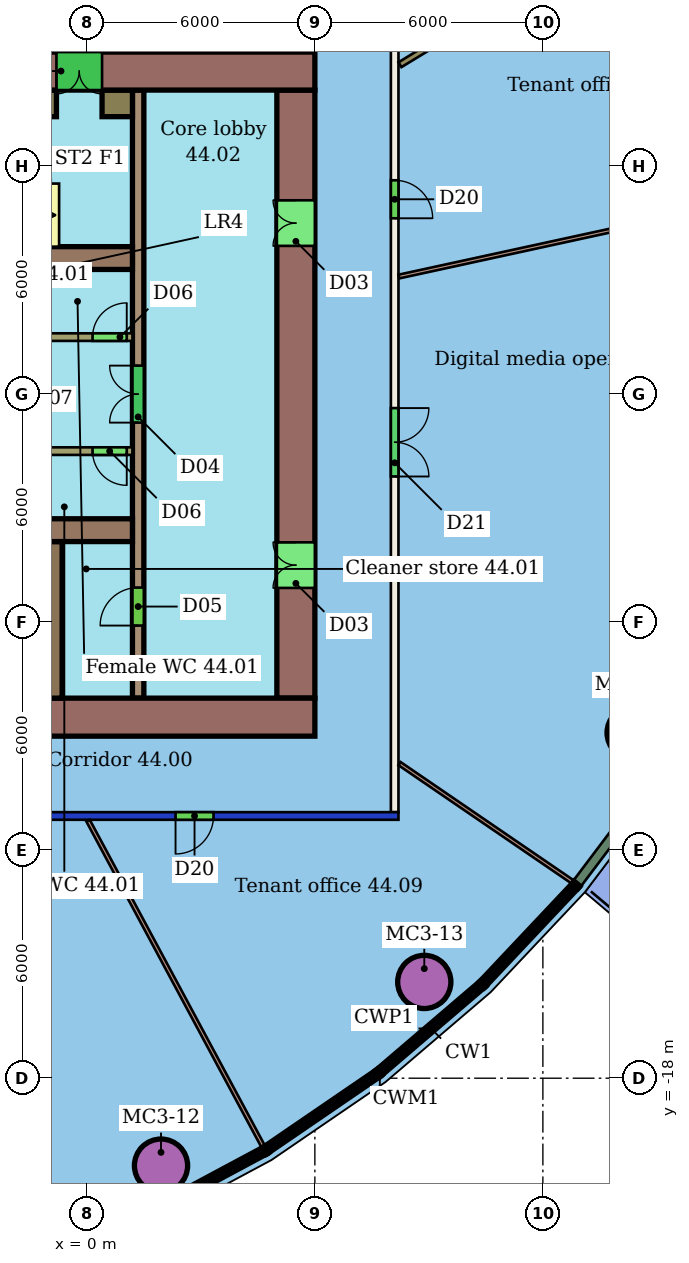
"""IFC4 building model, lengths in metres.
Left out: names, types, materials, properties, quantities, classifications, styles, units other than length and angle.
Written with IfcOpenShell. Run it as: python <this file> out.ifc"""

import sys

from ifc_helpers import new_model, si_unit, direction, frame, frame_2d, origin, origin_2d, place, context, subcontext, project, spatial, rectangle, hollow_circle, extrude, element, fill, save


model = new_model("IFC4")
c1 = context("Model", 3, precision=1e-05, world=origin(), true_north=direction((0.0, 1.0)))
c2 = subcontext(c1, "Body", "Model", "MODEL_VIEW")
j1 = project(units=[si_unit("LENGTHUNIT", "METRE"), si_unit("PLANEANGLEUNIT", "RADIAN")], contexts=[c1])
p1 = place(None, origin())
s1 = spatial("IfcSite", under=j1, at=p1, CompositionType="ELEMENT")
p2 = place(p1, origin())
s2 = spatial("IfcBuilding", under=s1, at=p2, CompositionType="ELEMENT")
p3 = place(p2, frame((0.0, 0.0, 183.0)))
s3 = spatial("IfcBuildingStorey", under=s2, at=p3, CompositionType="ELEMENT", Elevation=183.0)
for number, where, z_axis, x_axis in (
    (1, (1.952, -20.301, 0.0), (0.0, 0.0, 1.0), (1.0, 0.0, 0.0)),
    (2, (8.879, -15.467, 0.0), (0.0, 0.0, 1.0), (1.0, 0.0, 0.0)),
    (3, (14.388, -8.912, 0.0), (0.0, 0.0, 1.0), (1.0, 0.0, 0.0)),
):
    element("IfcColumn", number, at=place(p3, frame(where, z_axis=z_axis, x_axis=x_axis)), inside=s3, PredefinedType="COLUMN", context=c2, shape_type="SweptSolid", body=[
        extrude(hollow_circle(Radius=0.7, WallThickness=0.05, at=origin_2d()), origin(), (0.0, 0.0, 1.0), 3.45),
    ])
p4 = place(p3, frame((8.2, -11.1, 0.0), z_axis=(0.0, 0.0, 1.0), x_axis=(-1.0, 0.0, 0.0)))
e4 = element("IfcWall", 4, at=p4, inside=s3, PredefinedType="PARTITIONING", context=c2, shape_type="SweptSolid", body=[
    extrude(rectangle(XDim=28.4, YDim=0.2, at=frame_2d((14.2, 0.0))), origin(), (0.0, 0.0, 1.0), 3.05),
])
p5 = place(p4, frame((22.184, 0.0, 0.0)))
e5 = element("IfcOpeningElement", 5, at=p5, cuts=e4, PredefinedType="OPENING", context=c2, shape_type="SweptSolid", body=[
    extrude(rectangle(XDim=1.8, YDim=2.1, at=frame_2d((0.9, 1.05))), frame((0.0, 0.11, 0.0), z_axis=(0.0, -1.0, 0.0), x_axis=(1.0, 0.0, 0.0)), (0.0, 0.0, 1.0), 0.22),
])
p6 = place(p4, frame((15.038, 0.0, 0.0)))
e6 = element("IfcOpeningElement", 6, at=p6, cuts=e4, PredefinedType="OPENING", context=c2, shape_type="SweptSolid", body=[
    extrude(rectangle(XDim=1.8, YDim=2.1, at=frame_2d((0.9, 1.05))), frame((0.0, 0.11, 0.0), z_axis=(0.0, -1.0, 0.0), x_axis=(1.0, 0.0, 0.0)), (0.0, 0.0, 1.0), 0.22),
])
p7 = place(p4, frame((4.866, 0.0, 0.0)))
e7 = element("IfcOpeningElement", 7, at=p7, cuts=e4, PredefinedType="OPENING", context=c2, shape_type="SweptSolid", body=[
    extrude(rectangle(XDim=1.0, YDim=2.1, at=frame_2d((0.5, 1.05))), frame((0.0, 0.11, 0.0), z_axis=(0.0, -1.0, 0.0), x_axis=(1.0, 0.0, 0.0)), (0.0, 0.0, 1.0), 0.22),
])
p8 = place(p3, frame((8.1, 11.0, 0.0), z_axis=(0.0, 0.0, 1.0), x_axis=(0.0, -1.0, 0.0)))
e8 = element("IfcWall", 8, at=p8, inside=s3, PredefinedType="PARTITIONING", context=c2, shape_type="SweptSolid", body=[
    extrude(rectangle(XDim=22.0, YDim=0.2, at=frame_2d((11.0, 0.0))), origin(), (0.0, 0.0, 1.0), 3.45),
])
p9 = place(p8, frame((11.367, 0.0, 0.0)))
e9 = element("IfcOpeningElement", 9, at=p9, cuts=e8, PredefinedType="OPENING", context=c2, shape_type="SweptSolid", body=[
    extrude(rectangle(XDim=1.8, YDim=2.1, at=frame_2d((0.9, 1.05))), frame((0.0, 0.11, 0.0), z_axis=(0.0, -1.0, 0.0), x_axis=(1.0, 0.0, 0.0)), (0.0, 0.0, 1.0), 0.22),
])
p10 = place(p8, frame((5.373, 0.0, 0.0)))
e10 = element("IfcOpeningElement", 10, at=p10, cuts=e8, PredefinedType="OPENING", context=c2, shape_type="SweptSolid", body=[
    extrude(rectangle(XDim=1.0, YDim=2.1, at=frame_2d((0.5, 1.05))), frame((0.0, 0.11, 0.0), z_axis=(0.0, -1.0, 0.0), x_axis=(1.0, 0.0, 0.0)), (0.0, 0.0, 1.0), 0.22),
])
p11 = place(p3, frame((4.636, -19.79, 0.0), z_axis=(0.0, 0.0, 1.0), x_axis=(-0.473408054694, 0.880843240169, 0.0)))
e11 = element("IfcWall", 11, at=p11, inside=s3, PredefinedType="PARTITIONING", context=c2, shape_type="SweptSolid", body=[
    extrude(rectangle(XDim=9.725, YDim=0.1, at=frame_2d((4.863, 0.0))), origin(), (0.0, 0.0, 1.0), 3.45),
])
p12 = place(p3, frame((12.779, -12.832, 0.0), z_axis=(0.0, 0.0, 1.0), x_axis=(-0.825651519224, 0.564180439933, 0.0)))
e12 = element("IfcWall", 12, at=p12, inside=s3, PredefinedType="PARTITIONING", context=c2, shape_type="SweptSolid", body=[
    extrude(rectangle(XDim=5.512, YDim=0.1, at=frame_2d((2.756, 0.0))), origin(), (0.0, 0.0, 1.0), 3.45),
])
p13 = place(p3, frame((19.634, 5.58, 0.0), z_axis=(0.0, 0.0, 1.0), x_axis=(-0.977119787855, -0.212689727497, 0.0)))
e13 = element("IfcWall", 13, at=p13, inside=s3, PredefinedType="PARTITIONING", context=c2, shape_type="SweptSolid", body=[
    extrude(rectangle(XDim=11.691, YDim=0.1, at=frame_2d((5.846, 0.0))), origin(), (0.0, 0.0, 1.0), 3.45),
])
p14 = place(p3, frame((17.335, 14.204, 0.0), z_axis=(0.0, 0.0, 1.0), x_axis=(-0.854194128167, -0.51995422049, 0.0)))
e14 = element("IfcWall", 14, at=p14, inside=s3, PredefinedType="PARTITIONING", context=c2, shape_type="SweptSolid", body=[
    extrude(rectangle(XDim=10.648, YDim=0.15, at=frame_2d((5.324, 0.0))), origin(), (0.0, 0.0, 1.0), 3.45),
])
p15 = place(p3, frame((12.908, -12.869, 0.0), z_axis=(0.0, 0.0, 1.0), x_axis=(0.602031278038, 0.798472504388, 0.0)))
e15 = element("IfcWall", 15, at=p15, inside=s3, PredefinedType="SOLIDWALL", context=c2, shape_type="SweptSolid", body=[
    extrude(rectangle(XDim=3.477, YDim=0.25, at=frame_2d((1.739, 0.0))), origin(), (0.0, 0.0, 1.0), 3.1),
])
p16 = place(p3, frame((6.0, 8.5, 0.0), z_axis=(0.0, 0.0, 1.0), x_axis=(-1.0, 0.0, 0.0)))
e16 = element("IfcWall", 16, at=p16, inside=s3, PredefinedType="SHEAR", context=c2, shape_type="SweptSolid", body=[
    extrude(rectangle(XDim=12.0, YDim=1.0, at=frame_2d((6.0, 0.0))), origin(), (0.0, 0.0, 1.0), 3.3),
])
p17 = place(p16, frame((5.6, 0.0, 0.0)))
e17 = element("IfcOpeningElement", 17, at=p17, cuts=e16, PredefinedType="OPENING", context=c2, shape_type="SweptSolid", body=[
    extrude(rectangle(XDim=1.2, YDim=2.1, at=frame_2d((0.6, 1.05))), frame((0.0, 0.51, 0.0), z_axis=(0.0, -1.0, 0.0), x_axis=(1.0, 0.0, 0.0)), (0.0, 0.0, 1.0), 1.02),
])
p18 = place(p3, frame((-18.0, -8.5, 0.0), z_axis=(0.0, 0.0, 1.0), x_axis=(1.0, 0.0, 0.0)))
e18 = element("IfcWall", 18, at=p18, inside=s3, PredefinedType="SHEAR", context=c2, shape_type="SweptSolid", body=[
    extrude(rectangle(XDim=24.0, YDim=1.0, at=frame_2d((12.0, 0.0))), origin(), (0.0, 0.0, 1.0), 3.3),
])
p19 = place(p18, frame((6.0, 0.0, 0.0)))
e19 = element("IfcOpeningElement", 19, at=p19, cuts=e18, PredefinedType="OPENING", context=c2, shape_type="SweptSolid", body=[
    extrude(rectangle(XDim=1.2, YDim=2.1, at=frame_2d((0.6, 1.05))), frame((0.0, 0.51, 0.0), z_axis=(0.0, -1.0, 0.0), x_axis=(1.0, 0.0, 0.0)), (0.0, 0.0, 1.0), 1.02),
])
p20 = place(p3, frame((5.5, -8.0, 0.0), z_axis=(0.0, 0.0, 1.0), x_axis=(0.0, 1.0, 0.0)))
e20 = element("IfcWall", 20, at=p20, inside=s3, PredefinedType="SHEAR", context=c2, shape_type="SweptSolid", body=[
    extrude(rectangle(XDim=16.0, YDim=1.0, at=frame_2d((8.0, 0.0))), origin(), (0.0, 0.0, 1.0), 3.3),
])
p21 = place(p20, frame((2.9, 0.0, 0.0)))
e21 = element("IfcOpeningElement", 21, at=p21, cuts=e20, PredefinedType="OPENING", context=c2, shape_type="SweptSolid", body=[
    extrude(rectangle(XDim=1.2, YDim=2.1, at=frame_2d((0.6, 1.05))), frame((0.0, 0.51, 0.0), z_axis=(0.0, -1.0, 0.0), x_axis=(1.0, 0.0, 0.0)), (0.0, 0.0, 1.0), 1.02),
])
p22 = place(p20, frame((11.9, 0.0, 0.0)))
e22 = element("IfcOpeningElement", 22, at=p22, cuts=e20, PredefinedType="OPENING", context=c2, shape_type="SweptSolid", body=[
    extrude(rectangle(XDim=1.2, YDim=2.1, at=frame_2d((0.6, 1.05))), frame((0.0, 0.51, 0.0), z_axis=(0.0, -1.0, 0.0), x_axis=(1.0, 0.0, 0.0)), (0.0, 0.0, 1.0), 1.02),
])
for number, where, z_axis, x_axis in (
    (23, (-6.0, 3.58, 0.0), (0.0, 0.0, 1.0), (1.0, 0.0, 0.0)),
    (24, (-6.0, -3.58, 0.0), (0.0, 0.0, 1.0), (1.0, 0.0, 0.0)),
):
    element("IfcWall", number, at=place(p3, frame(where, z_axis=z_axis, x_axis=x_axis)), inside=s3, PredefinedType="SHEAR", context=c2, shape_type="SweptSolid", body=[
        extrude(rectangle(XDim=7.2, YDim=0.6, at=frame_2d((3.6, 0.0))), origin(), (0.0, 0.0, 1.0), 3.3),
    ])
p23 = place(p3, frame((1.35, -8.0, 0.0), z_axis=(0.0, 0.0, 1.0), x_axis=(0.0, 1.0, 0.0)))
e25 = element("IfcWall", 25, at=p23, inside=s3, PredefinedType="SHEAR", context=c2, shape_type="SweptSolid", body=[
    extrude(rectangle(XDim=16.0, YDim=0.3, at=frame_2d((8.0, 0.0))), origin(), (0.0, 0.0, 1.0), 3.3),
])
p24 = place(p23, frame((1.91, 0.0, 0.0)))
e26 = element("IfcOpeningElement", 26, at=p24, cuts=e25, PredefinedType="OPENING", context=c2, shape_type="SweptSolid", body=[
    extrude(rectangle(XDim=1.0, YDim=2.1, at=frame_2d((0.5, 1.05))), frame((0.0, 0.16, 0.0), z_axis=(0.0, -1.0, 0.0), x_axis=(1.0, 0.0, 0.0)), (0.0, 0.0, 1.0), 0.32),
])
p25 = place(p23, frame((7.25, 0.0, 0.0)))
e27 = element("IfcOpeningElement", 27, at=p25, cuts=e25, PredefinedType="OPENING", context=c2, shape_type="SweptSolid", body=[
    extrude(rectangle(XDim=1.5, YDim=2.1, at=frame_2d((0.75, 1.05))), frame((0.0, 0.16, 0.0), z_axis=(0.0, -1.0, 0.0), x_axis=(1.0, 0.0, 0.0)), (0.0, 0.0, 1.0), 0.32),
])
p26 = place(p3, frame((-13.2, 1.5, 0.0), z_axis=(0.0, 0.0, 1.0), x_axis=(1.0, 0.0, 0.0)))
e28 = element("IfcWall", 28, at=p26, inside=s3, PredefinedType="SHEAR", context=c2, shape_type="SweptSolid", body=[
    extrude(rectangle(XDim=14.4, YDim=0.2, at=frame_2d((7.2, 0.0))), origin(), (0.0, 0.0, 1.0), 3.3),
])
p27 = place(p26, frame((0.546, 0.0, 0.0)))
e29 = element("IfcOpeningElement", 29, at=p27, cuts=e28, PredefinedType="OPENING", context=c2, shape_type="SweptSolid", body=[
    extrude(rectangle(XDim=1.1, YDim=2.1, at=frame_2d((0.55, 1.05))), frame((0.0, 0.11, 0.0), z_axis=(0.0, -1.0, 0.0), x_axis=(1.0, 0.0, 0.0)), (0.0, 0.0, 1.0), 0.22),
])
p28 = place(p26, frame((2.988, 0.0, 0.0)))
e30 = element("IfcOpeningElement", 30, at=p28, cuts=e28, PredefinedType="OPENING", context=c2, shape_type="SweptSolid", body=[
    extrude(rectangle(XDim=1.1, YDim=2.1, at=frame_2d((0.55, 1.05))), frame((0.0, 0.11, 0.0), z_axis=(0.0, -1.0, 0.0), x_axis=(1.0, 0.0, 0.0)), (0.0, 0.0, 1.0), 0.22),
])
p29 = place(p26, frame((5.429, 0.0, 0.0)))
e31 = element("IfcOpeningElement", 31, at=p29, cuts=e28, PredefinedType="OPENING", context=c2, shape_type="SweptSolid", body=[
    extrude(rectangle(XDim=1.1, YDim=2.1, at=frame_2d((0.55, 1.05))), frame((0.0, 0.11, 0.0), z_axis=(0.0, -1.0, 0.0), x_axis=(1.0, 0.0, 0.0)), (0.0, 0.0, 1.0), 0.22),
])
p30 = place(p26, frame((7.871, 0.0, 0.0)))
e32 = element("IfcOpeningElement", 32, at=p30, cuts=e28, PredefinedType="OPENING", context=c2, shape_type="SweptSolid", body=[
    extrude(rectangle(XDim=1.1, YDim=2.1, at=frame_2d((0.55, 1.05))), frame((0.0, 0.11, 0.0), z_axis=(0.0, -1.0, 0.0), x_axis=(1.0, 0.0, 0.0)), (0.0, 0.0, 1.0), 0.22),
])
p31 = place(p26, frame((10.21, 0.0, 0.0)))
e33 = element("IfcOpeningElement", 33, at=p31, cuts=e28, PredefinedType="OPENING", context=c2, shape_type="SweptSolid", body=[
    extrude(rectangle(XDim=1.0, YDim=2.1, at=frame_2d((0.5, 1.05))), frame((0.0, 0.11, 0.0), z_axis=(0.0, -1.0, 0.0), x_axis=(1.0, 0.0, 0.0)), (0.0, 0.0, 1.0), 0.22),
])
p32 = place(p26, frame((13.35, 0.0, 0.0)))
e34 = element("IfcOpeningElement", 34, at=p32, cuts=e28, PredefinedType="OPENING", context=c2, shape_type="SweptSolid", body=[
    extrude(rectangle(XDim=0.9, YDim=2.1, at=frame_2d((0.45, 1.05))), frame((0.0, 0.11, 0.0), z_axis=(0.0, -1.0, 0.0), x_axis=(1.0, 0.0, 0.0)), (0.0, 0.0, 1.0), 0.22),
])
p33 = place(p3, frame((1.2, -1.5, 0.0), z_axis=(0.0, 0.0, 1.0), x_axis=(-1.0, 0.0, 0.0)))
e35 = element("IfcWall", 35, at=p33, inside=s3, PredefinedType="SHEAR", context=c2, shape_type="SweptSolid", body=[
    extrude(rectangle(XDim=14.4, YDim=0.2, at=frame_2d((7.2, 0.0))), origin(), (0.0, 0.0, 1.0), 3.3),
])
p34 = place(p33, frame((7.821, 0.0, 0.0)))
e36 = element("IfcOpeningElement", 36, at=p34, cuts=e35, PredefinedType="OPENING", context=c2, shape_type="SweptSolid", body=[
    extrude(rectangle(XDim=1.2, YDim=2.1, at=frame_2d((0.6, 1.05))), frame((0.0, 0.11, 0.0), z_axis=(0.0, -1.0, 0.0), x_axis=(1.0, 0.0, 0.0)), (0.0, 0.0, 1.0), 0.22),
])
p35 = place(p33, frame((0.15, 0.0, 0.0)))
e37 = element("IfcOpeningElement", 37, at=p35, cuts=e35, PredefinedType="OPENING", context=c2, shape_type="SweptSolid", body=[
    extrude(rectangle(XDim=0.9, YDim=2.1, at=frame_2d((0.45, 1.05))), frame((0.0, 0.11, 0.0), z_axis=(0.0, -1.0, 0.0), x_axis=(1.0, 0.0, 0.0)), (0.0, 0.0, 1.0), 0.22),
])
p36 = place(p3, frame((-0.85, -3.88, 0.0), z_axis=(0.0, 0.0, 1.0), x_axis=(0.0, -1.0, 0.0)))
e38 = element("IfcWall", 38, at=p36, inside=s3, PredefinedType="SHEAR", context=c2, shape_type="SweptSolid", body=[
    extrude(rectangle(XDim=4.12, YDim=0.4, at=frame_2d((2.06, 0.0))), origin(), (0.0, 0.0, 1.0), 3.3),
])
p37 = place(p3, frame((-5.85, 7.65, 0.0), z_axis=(0.0, 0.0, 1.0), x_axis=(1.0, 0.0, 0.0)))
e39 = element("IfcWall", 39, at=p37, inside=s3, PredefinedType="SHEAR", context=c2, shape_type="SweptSolid", body=[
    extrude(rectangle(XDim=5.05, YDim=0.7, at=frame_2d((2.525, 0.0))), origin(), (0.0, 0.0, 1.0), 3.3),
])
p38 = place(p3, frame((0.4, 7.65, 0.0), z_axis=(0.0, 0.0, 1.0), x_axis=(1.0, 0.0, 0.0)))
e40 = element("IfcWall", 40, at=p38, inside=s3, PredefinedType="SHEAR", context=c2, shape_type="SweptSolid", body=[
    extrude(rectangle(XDim=0.8, YDim=0.7, at=frame_2d((0.4, 0.0))), origin(), (0.0, 0.0, 1.0), 3.3),
])
p39 = place(p7, origin())
e41 = element("IfcDoor", 41, at=p39, inside=s3, OperationType="SINGLE_SWING_RIGHT", PredefinedType="DOOR", context=c2, shape_type="SweptSolid", body=[
    extrude(rectangle(XDim=1.0, YDim=2.1, at=frame_2d((0.5, 1.05))), frame((0.0, 0.025, 0.0), z_axis=(0.0, -1.0, 0.0), x_axis=(1.0, 0.0, 0.0)), (0.0, 0.0, 1.0), 0.05),
])
fill(e7, e41)
p40 = place(p9, origin())
e42 = element("IfcDoor", 42, at=p40, inside=s3, OperationType="DOUBLE_DOOR_SINGLE_SWING", PredefinedType="DOOR", context=c2, shape_type="SweptSolid", body=[
    extrude(rectangle(XDim=1.8, YDim=2.1, at=frame_2d((0.9, 1.05))), frame((0.0, 0.025, 0.0), z_axis=(0.0, -1.0, 0.0), x_axis=(1.0, 0.0, 0.0)), (0.0, 0.0, 1.0), 0.05),
])
fill(e9, e42)
p41 = place(p10, origin())
e43 = element("IfcDoor", 43, at=p41, inside=s3, OperationType="SINGLE_SWING_RIGHT", PredefinedType="DOOR", context=c2, shape_type="SweptSolid", body=[
    extrude(rectangle(XDim=1.0, YDim=2.1, at=frame_2d((0.5, 1.05))), frame((0.0, 0.025, 0.0), z_axis=(0.0, -1.0, 0.0), x_axis=(1.0, 0.0, 0.0)), (0.0, 0.0, 1.0), 0.05),
])
fill(e10, e43)
p42 = place(p17, origin())
e44 = element("IfcDoor", 44, at=p42, inside=s3, OperationType="DOUBLE_DOOR_SINGLE_SWING", PredefinedType="NOTDEFINED", context=c2, shape_type="SweptSolid", body=[
    extrude(rectangle(XDim=1.2, YDim=2.1, at=frame_2d((0.6, 1.05))), frame((0.0, 0.025, 0.0), z_axis=(0.0, -1.0, 0.0), x_axis=(1.0, 0.0, 0.0)), (0.0, 0.0, 1.0), 0.05),
])
fill(e17, e44)
p43 = place(p21, origin())
e45 = element("IfcDoor", 45, at=p43, inside=s3, OperationType="DOUBLE_DOOR_SINGLE_SWING", PredefinedType="NOTDEFINED", context=c2, shape_type="SweptSolid", body=[
    extrude(rectangle(XDim=1.2, YDim=2.1, at=frame_2d((0.6, 1.05))), frame((0.0, 0.025, 0.0), z_axis=(0.0, -1.0, 0.0), x_axis=(1.0, 0.0, 0.0)), (0.0, 0.0, 1.0), 0.05),
])
fill(e21, e45)
p44 = place(p22, origin())
e46 = element("IfcDoor", 46, at=p44, inside=s3, OperationType="DOUBLE_DOOR_SINGLE_SWING", PredefinedType="NOTDEFINED", context=c2, shape_type="SweptSolid", body=[
    extrude(rectangle(XDim=1.2, YDim=2.1, at=frame_2d((0.6, 1.05))), frame((0.0, 0.025, 0.0), z_axis=(0.0, -1.0, 0.0), x_axis=(1.0, 0.0, 0.0)), (0.0, 0.0, 1.0), 0.05),
])
fill(e22, e46)
p45 = place(p24, origin())
e47 = element("IfcDoor", 47, at=p45, inside=s3, OperationType="SINGLE_SWING_LEFT", PredefinedType="NOTDEFINED", context=c2, shape_type="SweptSolid", body=[
    extrude(rectangle(XDim=1.0, YDim=2.1, at=frame_2d((0.5, 1.05))), frame((0.0, 0.025, 0.0), z_axis=(0.0, -1.0, 0.0), x_axis=(1.0, 0.0, 0.0)), (0.0, 0.0, 1.0), 0.05),
])
fill(e26, e47)
p46 = place(p25, origin())
e48 = element("IfcDoor", 48, at=p46, inside=s3, OperationType="DOUBLE_DOOR_SINGLE_SWING", PredefinedType="NOTDEFINED", context=c2, shape_type="SweptSolid", body=[
    extrude(rectangle(XDim=1.5, YDim=2.1, at=frame_2d((0.75, 1.05))), frame((0.0, 0.025, 0.0), z_axis=(0.0, -1.0, 0.0), x_axis=(1.0, 0.0, 0.0)), (0.0, 0.0, 1.0), 0.05),
])
fill(e27, e48)
p47 = place(p32, origin())
e49 = element("IfcDoor", 49, at=p47, inside=s3, OperationType="SINGLE_SWING_RIGHT", PredefinedType="NOTDEFINED", context=c2, shape_type="SweptSolid", body=[
    extrude(rectangle(XDim=0.9, YDim=2.1, at=frame_2d((0.45, 1.05))), frame((0.0, 0.025, 0.0), z_axis=(0.0, -1.0, 0.0), x_axis=(1.0, 0.0, 0.0)), (0.0, 0.0, 1.0), 0.05),
])
fill(e34, e49)
p48 = place(p35, origin())
e50 = element("IfcDoor", 50, at=p48, inside=s3, OperationType="SINGLE_SWING_LEFT", PredefinedType="NOTDEFINED", context=c2, shape_type="SweptSolid", body=[
    extrude(rectangle(XDim=0.9, YDim=2.1, at=frame_2d((0.45, 1.05))), frame((0.0, 0.025, 0.0), z_axis=(0.0, -1.0, 0.0), x_axis=(1.0, 0.0, 0.0)), (0.0, 0.0, 1.0), 0.05),
])
fill(e37, e50)
save(model, sys.argv[1])
